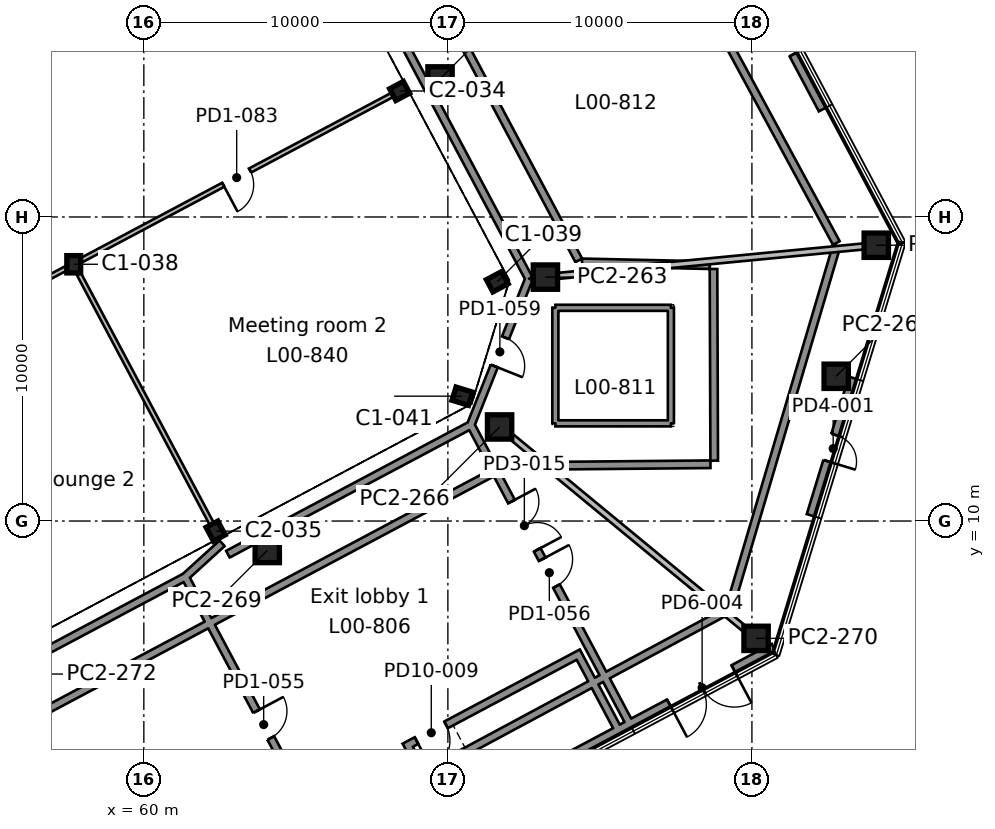
"""IFC4 building model, lengths in metres.
Left out: names, types, materials, properties, quantities, classifications, styles, units other than length and angle.
Written with IfcOpenShell. Run it as: python <this file> out.ifc"""

import sys

from ifc_helpers import new_model, si_unit, direction, frame, frame_2d, origin, origin_2d, place, context, subcontext, project, spatial, rectangle, i_section, extrude, element, fill, save


model = new_model("IFC4")
c1 = context("Model", 3, precision=1e-05, world=origin(), true_north=direction((0.0, 1.0)))
c2 = subcontext(c1, "Body", "Model", "MODEL_VIEW")
j1 = project(units=[si_unit("LENGTHUNIT", "METRE"), si_unit("PLANEANGLEUNIT", "RADIAN")], contexts=[c1])
p1 = place(None, origin())
s1 = spatial("IfcSite", under=j1, at=p1, CompositionType="ELEMENT")
p2 = place(p1, origin())
s2 = spatial("IfcBuilding", under=s1, at=p2, CompositionType="ELEMENT")
p3 = place(p2, origin())
s3 = spatial("IfcBuildingStorey", under=s2, at=p3, CompositionType="ELEMENT", Elevation=0.0)
p4 = place(p3, frame((62.361, 9.668, 0.0), z_axis=(0.0, 0.0, 1.0), x_axis=(0.882947592859, 0.469471562786, 0.0)))
e1 = element("IfcColumn", 1, at=p4, inside=s3, PredefinedType="COLUMN", context=c2, shape_type="SweptSolid", body=[
    extrude(i_section(OverallWidth=0.437, OverallDepth=0.513, WebThickness=0.061, FlangeThickness=0.097, FilletRadius=0.015, at=origin_2d()), origin(), (0.0, 0.0, 1.0), 7.0),
])
for number, where, z_axis, x_axis in (
    (2, (70.474, 14.106, 0.0), (0.0, 0.0, 1.0), (0.292, 0.956, 0.0)),
    (3, (71.625, 17.871, 0.0), (0.0, 0.0, 1.0), (-0.469, 0.883, 0.0)),
    (4, (57.694, 18.445, 0.0), (0.0, 0.0, 1.0), (1.0, 0.0, 0.0)),
):
    element("IfcColumn", number, at=place(p3, frame(where, z_axis=z_axis, x_axis=x_axis)), inside=s3, PredefinedType="COLUMN", context=c2, shape_type="SweptSolid", body=[
        extrude(i_section(OverallWidth=0.455, OverallDepth=0.569, WebThickness=0.078, FlangeThickness=0.125, FilletRadius=0.015, at=origin_2d()), origin(), (0.0, 0.0, 1.0), 7.0),
    ])
p5 = place(p3, frame((68.413, 24.144, 0.0), z_axis=(0.0, 0.0, 1.0), x_axis=(-0.469471562786, 0.882947592859, 0.0)))
e5 = element("IfcColumn", 5, at=p5, inside=s3, PredefinedType="COLUMN", context=c2, shape_type="SweptSolid", body=[
    extrude(i_section(OverallWidth=0.437, OverallDepth=0.513, WebThickness=0.061, FlangeThickness=0.097, FilletRadius=0.015, at=origin_2d()), origin(), (0.0, 0.0, 1.0), 7.0),
])
for number, where, z_axis, x_axis in (
    (6, (80.137, 6.141, 0.0), (0.0, 0.0, 1.0), (1.0, 0.0, 0.0)),
    (7, (64.059, 9.031, 0.0), (0.0, 0.0, 1.0), (1.0, 0.0, 0.0)),
    (8, (71.701, 13.094, 0.0), (0.0, 0.0, 1.0), (1.0, 0.0, 0.0)),
    (9, (82.772, 14.761, 0.0), (0.0, 0.0, 1.0), (1.0, 0.0, 0.0)),
    (10, (73.208, 18.023, 0.0), (0.0, 0.0, 1.0), (1.0, 0.0, 0.0)),
    (11, (84.09, 19.071, 0.0), (0.0, 0.0, 1.0), (1.0, 0.0, 0.0)),
    (12, (69.742, 24.541, 0.0), (0.0, 0.0, 1.0), (1.0, 0.0, 0.0)),
):
    element("IfcColumn", number, at=place(p3, frame(where, z_axis=z_axis, x_axis=x_axis)), inside=s3, PredefinedType="COLUMN", context=c2, shape_type="SweptSolid", body=[
        extrude(rectangle(XDim=0.8, YDim=0.8, at=origin_2d()), origin(), (0.0, 0.0, 1.0), 6.37),
    ])
p6 = place(p3, frame((66.617, -1.727, 0.0), z_axis=(0.0, 0.0, 1.0), x_axis=(0.882952470549, 0.469462389071, 0.0)))
e13 = element("IfcWall", 13, at=p6, inside=s3, PredefinedType="SOLIDWALL", context=c2, shape_type="SweptSolid", body=[
    extrude(rectangle(XDim=15.999, YDim=0.4, at=frame_2d((8.0, 0.0))), origin(), (0.0, 0.0, 1.0), 6.37),
])
p7 = place(p6, frame((0.9, 0.0, 0.0)))
e14 = element("IfcOpeningElement", 14, at=p7, cuts=e13, PredefinedType="OPENING", context=c2, shape_type="SweptSolid", body=[
    extrude(rectangle(XDim=1.8, YDim=2.1, at=frame_2d((0.9, 1.05))), frame((0.0, 0.21, 0.0), z_axis=(0.0, -1.0, 0.0), x_axis=(1.0, 0.0, 0.0)), (0.0, 0.0, 1.0), 0.42),
])
p8 = place(p6, frame((12.101, 0.0, 0.0)))
e15 = element("IfcOpeningElement", 15, at=p8, cuts=e13, PredefinedType="OPENING", context=c2, shape_type="SweptSolid", body=[
    extrude(rectangle(XDim=2.4, YDim=2.4, at=frame_2d((1.2, 1.2))), frame((0.0, 0.21, 0.0), z_axis=(0.0, -1.0, 0.0), x_axis=(1.0, 0.0, 0.0)), (0.0, 0.0, 1.0), 0.42),
])
p9 = place(p3, frame((81.996, 10.17, 0.0), z_axis=(0.0, 0.0, 1.0), x_axis=(0.292379898693, 0.956302250777, 0.0)))
e16 = element("IfcWall", 16, at=p9, inside=s3, PredefinedType="SOLIDWALL", context=c2, shape_type="SweptSolid", body=[
    extrude(rectangle(XDim=4.728, YDim=0.4, at=frame_2d((2.364, 0.0))), origin(), (0.0, 0.0, 1.0), 6.37),
])
p10 = place(p9, frame((1.864, 0.0, 0.0)))
e17 = element("IfcOpeningElement", 17, at=p10, cuts=e16, PredefinedType="OPENING", context=c2, shape_type="SweptSolid", body=[
    extrude(rectangle(XDim=0.9, YDim=2.1, at=frame_2d((0.45, 1.05))), frame((0.0, 0.21, 0.0), z_axis=(0.0, -1.0, 0.0), x_axis=(1.0, 0.0, 0.0)), (0.0, 0.0, 1.0), 0.42),
])
p11 = place(p3, frame((82.379, 23.567, 0.0), z_axis=(0.0, 0.0, 1.0), x_axis=(-0.469469391506, 0.882948747345, 0.0)))
e18 = element("IfcWall", 18, at=p11, inside=s3, PredefinedType="SOLIDWALL", context=c2, shape_type="SweptSolid", body=[
    extrude(rectangle(XDim=5.189, YDim=0.4, at=frame_2d((2.594, 0.0))), origin(), (0.0, 0.0, 1.0), 6.37),
])
p12 = place(p11, frame((2.052, 0.0, 0.0)))
e19 = element("IfcOpeningElement", 19, at=p12, cuts=e18, PredefinedType="OPENING", context=c2, shape_type="SweptSolid", body=[
    extrude(rectangle(XDim=0.9, YDim=2.1, at=frame_2d((0.45, 1.05))), frame((0.0, 0.21, 0.0), z_axis=(0.0, -1.0, 0.0), x_axis=(1.0, 0.0, 0.0)), (0.0, 0.0, 1.0), 0.42),
])
p13 = place(p3, frame((71.913, 11.806, 7.0), z_axis=(0.0, 0.0, 1.0), x_axis=(0.999958126226, 0.0091512728, 0.0)))
e20 = element("IfcWall", 20, at=p13, inside=s3, PredefinedType="STANDARD", context=c2, shape_type="SweptSolid", body=[
    extrude(rectangle(XDim=6.723, YDim=0.25, at=frame_2d((3.361, 0.0))), origin(), (0.0, 0.0, 1.0), 0.65),
])
p14 = place(p3, frame((78.76, 11.985, 7.0), z_axis=(0.0, 0.0, 1.0), x_axis=(-0.003678581112, 0.999993233998, 0.0)))
e21 = element("IfcWall", 21, at=p14, inside=s3, PredefinedType="STANDARD", context=c2, shape_type="SweptSolid", body=[
    extrude(rectangle(XDim=6.305, YDim=0.25, at=frame_2d((3.152, 0.0))), origin(), (0.0, 0.0, 1.0), 0.65),
])
p15 = place(p3, frame((78.615, 18.415, 7.0), z_axis=(0.0, 0.0, 1.0), x_axis=(-0.999755151848, 0.022127728178, 0.0)))
e22 = element("IfcWall", 22, at=p15, inside=s3, PredefinedType="STANDARD", context=c2, shape_type="SweptSolid", body=[
    extrude(rectangle(XDim=4.204, YDim=0.25, at=frame_2d((2.102, 0.0))), origin(), (0.0, 0.0, 1.0), 0.65),
])
p16 = place(p3, frame((74.304, 18.574, 7.0), z_axis=(0.0, 0.0, 1.0), x_axis=(-0.469619931493, 0.882868687827, 0.0)))
e23 = element("IfcWall", 23, at=p16, inside=s3, PredefinedType="STANDARD", context=c2, shape_type="SweptSolid", body=[
    extrude(rectangle(XDim=11.637, YDim=0.25, at=frame_2d((5.819, 0.0))), origin(), (0.0, 0.0, 1.0), 0.65),
])
p17 = place(p3, frame((75.513, 32.559, 7.0), z_axis=(0.0, 0.0, 1.0), x_axis=(0.476092369677, -0.879395278322, 0.0)))
e24 = element("IfcWall", 24, at=p17, inside=s3, PredefinedType="STANDARD", context=c2, shape_type="SweptSolid", body=[
    extrude(rectangle(XDim=15.254, YDim=0.25, at=frame_2d((7.627, 0.0))), origin(), (0.0, 0.0, 1.0), 0.65),
])
p18 = place(p3, frame((82.785, 19.05, 7.0), z_axis=(0.0, 0.0, 1.0), x_axis=(-0.28349877708, -0.958972597833, 0.0)))
e25 = element("IfcWall", 25, at=p18, inside=s3, PredefinedType="STANDARD", context=c2, shape_type="SweptSolid", body=[
    extrude(rectangle(XDim=12.437, YDim=0.25, at=frame_2d((6.219, 0.0))), origin(), (0.0, 0.0, 1.0), 0.65),
])
p19 = place(p3, frame((79.199, 7.048, 7.0), z_axis=(0.0, 0.0, 1.0), x_axis=(-0.880943825578, -0.473220853488, 0.0)))
e26 = element("IfcWall", 26, at=p19, inside=s3, PredefinedType="STANDARD", context=c2, shape_type="SweptSolid", body=[
    extrude(rectangle(XDim=27.337, YDim=0.25, at=frame_2d((13.668, 0.0))), origin(), (0.0, 0.0, 1.0), 0.65),
])
p20 = place(p3, frame((51.478, 0.954, 7.0), z_axis=(0.0, 0.0, 1.0), x_axis=(0.88290924417, 0.469543679075, 0.0)))
e27 = element("IfcWall", 27, at=p20, inside=s3, PredefinedType="STANDARD", context=c2, shape_type="SweptSolid", body=[
    extrude(rectangle(XDim=23.081, YDim=0.25, at=frame_2d((11.541, 0.0))), origin(), (0.0, 0.0, 1.0), 0.65),
])
for number, where, z_axis, x_axis in (
    (28, (77.335, 13.213, 6.92), (0.0, 0.0, 1.0), (-1.0, 0.0, 0.0)),
    (29, (73.535, 13.213, 6.92), (0.0, 0.0, 1.0), (0.0, 1.0, 0.0)),
    (30, (73.535, 17.013, 6.92), (0.0, 0.0, 1.0), (1.0, 0.0, 0.0)),
    (31, (77.335, 17.013, 6.92), (0.0, 0.0, 1.0), (0.0, -1.0, 0.0)),
):
    element("IfcWall", number, at=place(p3, frame(where, z_axis=z_axis, x_axis=x_axis)), inside=s3, PredefinedType="SOLIDWALL", context=c2, shape_type="SweptSolid", body=[
        extrude(rectangle(XDim=3.8, YDim=0.2, at=frame_2d((1.9, 0.0))), origin(), (0.0, 0.0, 1.0), 0.18),
    ])
p21 = place(p3, frame((66.523, -1.551, 0.0), z_axis=(0.0, 0.0, 1.0), x_axis=(-0.469471626463, 0.882947559001, 0.0)))
e32 = element("IfcWall", 32, at=p21, inside=s3, PredefinedType="SOLIDWALL", context=c2, shape_type="SweptSolid", body=[
    extrude(rectangle(XDim=11.0, YDim=0.25, at=frame_2d((5.5, 0.0))), origin(), (0.0, 0.0, 1.0), 6.37),
])
p22 = place(p21, frame((5.0, 0.0, 0.0)))
e33 = element("IfcOpeningElement", 33, at=p22, cuts=e32, PredefinedType="OPENING", context=c2, shape_type="SweptSolid", body=[
    extrude(rectangle(XDim=1.0, YDim=2.1, at=frame_2d((0.5, 1.05))), frame((0.0, 0.135, 0.0), z_axis=(0.0, -1.0, 0.0), x_axis=(1.0, 0.0, 0.0)), (0.0, 0.0, 1.0), 0.27),
])
p23 = place(p3, frame((61.363, 8.164, 0.0), z_axis=(0.0, 0.0, 1.0), x_axis=(-0.882945796858, -0.469474940556, 0.0)))
e34 = element("IfcWall", 34, at=p23, inside=s3, PredefinedType="SOLIDWALL", context=c2, shape_type="SweptSolid", body=[
    extrude(rectangle(XDim=5.955, YDim=0.25, at=frame_2d((2.978, 0.0))), origin(), (0.0, 0.0, 1.0), 6.37),
])
p24 = place(p3, frame((75.919, 3.445, 0.0), z_axis=(0.0, 0.0, 1.0), x_axis=(-0.469463523634, 0.882951867305, 0.0)))
e35 = element("IfcWall", 35, at=p24, inside=s3, PredefinedType="SOLIDWALL", context=c2, shape_type="SweptSolid", body=[
    extrude(rectangle(XDim=11.0, YDim=0.25, at=frame_2d((5.5, 0.0))), origin(), (0.0, 0.0, 1.0), 6.37),
])
p25 = place(p24, frame((5.0, 0.0, 0.0)))
e36 = element("IfcOpeningElement", 36, at=p25, cuts=e35, PredefinedType="OPENING", context=c2, shape_type="SweptSolid", body=[
    extrude(rectangle(XDim=1.0, YDim=2.1, at=frame_2d((0.5, 1.05))), frame((0.0, 0.135, 0.0), z_axis=(0.0, -1.0, 0.0), x_axis=(1.0, 0.0, 0.0)), (0.0, 0.0, 1.0), 0.27),
])
p26 = place(p24, frame((6.35, 0.0, 0.0)))
e37 = element("IfcOpeningElement", 37, at=p26, cuts=e35, PredefinedType="OPENING", context=c2, shape_type="SweptSolid", body=[
    extrude(rectangle(XDim=1.8, YDim=2.1, at=frame_2d((0.9, 1.05))), frame((0.0, 0.135, 0.0), z_axis=(0.0, -1.0, 0.0), x_axis=(1.0, 0.0, 0.0)), (0.0, 0.0, 1.0), 0.27),
])
p27 = place(p3, frame((62.573, 9.268, 0.0), z_axis=(0.0, 0.0, 1.0), x_axis=(-0.739544046234, -0.673108166404, 0.0)))
e38 = element("IfcWall", 38, at=p27, inside=s3, PredefinedType="SOLIDWALL", context=c2, shape_type="SweptSolid", body=[
    extrude(rectangle(XDim=1.646, YDim=0.25, at=frame_2d((0.823, 0.0))), origin(), (0.0, 0.0, 1.0), 6.37),
])
p28 = place(p3, frame((70.758, 13.159, 0.0), z_axis=(0.0, 0.0, 1.0), x_axis=(-0.882950480299, -0.46946613226, 0.0)))
e39 = element("IfcWall", 39, at=p28, inside=s3, PredefinedType="SOLIDWALL", context=c2, shape_type="SweptSolid", body=[
    extrude(rectangle(XDim=7.941, YDim=0.25, at=frame_2d((3.971, 0.0))), origin(), (0.0, 0.0, 1.0), 6.37),
])
p29 = place(p3, frame((63.659, 9.385, 0.0), z_axis=(0.0, 0.0, 1.0), x_axis=(-0.882866012348, -0.469624961263, 0.0)))
e40 = element("IfcWall", 40, at=p29, inside=s3, PredefinedType="SOLIDWALL", context=c2, shape_type="SweptSolid", body=[
    extrude(rectangle(XDim=1.013, YDim=0.25, at=frame_2d((0.507, 0.0))), origin(), (0.0, 0.0, 1.0), 6.37),
])
p30 = place(p3, frame((79.737, 6.47, 0.0), z_axis=(0.0, 0.0, 1.0), x_axis=(-0.771621787966, 0.63608161138, 0.0)))
e41 = element("IfcWall", 41, at=p30, inside=s3, PredefinedType="PARTITIONING", context=c2, shape_type="SweptSolid", body=[
    extrude(rectangle(XDim=9.896, YDim=0.2, at=frame_2d((4.948, 0.0))), origin(), (0.0, 0.0, 1.0), 6.37),
])
p31 = place(p3, frame((83.69, 19.032, 0.0), z_axis=(0.0, 0.0, 1.0), x_axis=(-0.995397009029, -0.095837333105, 0.0)))
e42 = element("IfcWall", 42, at=p31, inside=s3, PredefinedType="PARTITIONING", context=c2, shape_type="SweptSolid", body=[
    extrude(rectangle(XDim=10.129, YDim=0.2, at=frame_2d((5.064, 0.0))), origin(), (0.0, 0.0, 1.0), 6.37),
])
p32 = place(p3, frame((72.669, 17.971, 0.0), z_axis=(0.0, 0.0, 1.0), x_axis=(-0.370009777786, -0.929027859831, 0.0)))
e43 = element("IfcWall", 43, at=p32, inside=s3, PredefinedType="SOLIDWALL", context=c2, shape_type="SweptSolid", body=[
    extrude(rectangle(XDim=5.184, YDim=0.25, at=frame_2d((2.592, 0.0))), origin(), (0.0, 0.0, 1.0), 6.37),
])
p33 = place(p32, frame((2.092, 0.0, 0.0)))
e44 = element("IfcOpeningElement", 44, at=p33, cuts=e43, PredefinedType="OPENING", context=c2, shape_type="SweptSolid", body=[
    extrude(rectangle(XDim=1.0, YDim=2.1, at=frame_2d((0.5, 1.05))), frame((0.0, 0.135, 0.0), z_axis=(0.0, -1.0, 0.0), x_axis=(1.0, 0.0, 0.0)), (0.0, 0.0, 1.0), 0.27),
])
p34 = place(p3, frame((65.923, 30.659, 0.0), z_axis=(0.0, 0.0, 1.0), x_axis=(0.469479540895, -0.882943350777, 0.0)))
e45 = element("IfcWall", 45, at=p34, inside=s3, PredefinedType="SOLIDWALL", context=c2, shape_type="SweptSolid", body=[
    extrude(rectangle(XDim=7.283, YDim=0.25, at=frame_2d((3.642, 0.0))), origin(), (0.0, 0.0, 1.0), 6.37),
])
p35 = place(p34, frame((3.141, 0.0, 0.0)))
e46 = element("IfcOpeningElement", 46, at=p35, cuts=e45, PredefinedType="OPENING", context=c2, shape_type="SweptSolid", body=[
    extrude(rectangle(XDim=1.0, YDim=2.1, at=frame_2d((0.5, 1.05))), frame((0.0, 0.135, 0.0), z_axis=(0.0, -1.0, 0.0), x_axis=(1.0, 0.0, 0.0)), (0.0, 0.0, 1.0), 0.27),
])
p36 = place(p3, frame((69.389, 24.141, 0.0), z_axis=(0.0, 0.0, 1.0), x_axis=(0.469461736628, -0.882952817449, 0.0)))
e47 = element("IfcWall", 47, at=p36, inside=s3, PredefinedType="SOLIDWALL", context=c2, shape_type="SweptSolid", body=[
    extrude(rectangle(XDim=6.988, YDim=0.25, at=frame_2d((3.494, 0.0))), origin(), (0.0, 0.0, 1.0), 6.37),
])
p37 = place(p3, frame((48.421, 13.514, 0.0), z_axis=(0.0, 0.0, 1.0), x_axis=(0.882940965658, 0.469484026526, 0.0)))
e48 = element("IfcWall", 48, at=p37, inside=s3, PredefinedType="PARTITIONING", context=c2, shape_type="SweptSolid", body=[
    extrude(rectangle(XDim=10.205, YDim=0.15, at=frame_2d((5.103, 0.0))), origin(), (0.0, 0.0, 1.0), 6.55),
])
p38 = place(p37, frame((4.603, 0.0, 0.0)))
e49 = element("IfcOpeningElement", 49, at=p38, cuts=e48, PredefinedType="OPENING", context=c2, shape_type="SweptSolid", body=[
    extrude(rectangle(XDim=1.0, YDim=2.1, at=frame_2d((0.5, 1.05))), frame((0.0, 0.085, 0.0), z_axis=(0.0, -1.0, 0.0), x_axis=(1.0, 0.0, 0.0)), (0.0, 0.0, 1.0), 0.17),
])
p39 = place(p3, frame((57.957, 18.584, 0.0), z_axis=(0.0, 0.0, 1.0), x_axis=(0.882944872937, 0.469476678179, 0.0)))
e50 = element("IfcWall", 50, at=p39, inside=s3, PredefinedType="PARTITIONING", context=c2, shape_type="SweptSolid", body=[
    extrude(rectangle(XDim=11.586, YDim=0.15, at=frame_2d((5.793, 0.0))), origin(), (0.0, 0.0, 1.0), 6.55),
])
p40 = place(p39, frame((5.273, 0.0, 0.0)))
e51 = element("IfcOpeningElement", 51, at=p40, cuts=e50, PredefinedType="OPENING", context=c2, shape_type="SweptSolid", body=[
    extrude(rectangle(XDim=1.0, YDim=2.1, at=frame_2d((0.5, 1.05))), frame((0.0, 0.085, 0.0), z_axis=(0.0, -1.0, 0.0), x_axis=(1.0, 0.0, 0.0)), (0.0, 0.0, 1.0), 0.17),
])
p41 = place(p3, frame((62.24, 9.894, 0.0), z_axis=(0.0, 0.0, 1.0), x_axis=(-0.469471003187, 0.882947890403, 0.0)))
e52 = element("IfcWall", 52, at=p41, inside=s3, PredefinedType="PARTITIONING", context=c2, shape_type="SweptSolid", body=[
    extrude(rectangle(XDim=9.326, YDim=0.15, at=frame_2d((4.663, 0.0))), origin(), (0.0, 0.0, 1.0), 6.55),
])
p42 = place(p3, frame((69.937, 0.264, 0.0), z_axis=(0.0, 0.0, 1.0), x_axis=(-0.469533439143, 0.882914689835, 0.0)))
e53 = element("IfcWall", 53, at=p42, inside=s3, PredefinedType="SOLIDWALL", context=c2, shape_type="SweptSolid", body=[
    extrude(rectangle(XDim=2.8, YDim=0.25, at=frame_2d((1.4, 0.0))), origin(), (0.0, 0.0, 1.0), 6.37),
])
p43 = place(p3, frame((75.544, 3.245, 0.0), z_axis=(0.0, 0.0, 1.0), x_axis=(-0.469497295046, 0.882933910293, 0.0)))
e54 = element("IfcWall", 54, at=p43, inside=s3, PredefinedType="SOLIDWALL", context=c2, shape_type="SweptSolid", body=[
    extrude(rectangle(XDim=2.8, YDim=0.25, at=frame_2d((1.4, 0.0))), origin(), (0.0, 0.0, 1.0), 6.37),
])
p44 = place(p3, frame((68.571, 2.567, 0.0), z_axis=(0.0, 0.0, 1.0), x_axis=(0.882937969766, 0.469489660743, 0.0)))
e55 = element("IfcWall", 55, at=p44, inside=s3, PredefinedType="SOLIDWALL", context=c2, shape_type="SweptSolid", body=[
    extrude(rectangle(XDim=6.6, YDim=0.25, at=frame_2d((3.3, 0.0))), origin(), (0.0, 0.0, 1.0), 6.37),
])
p45 = place(p44, frame((0.45, 0.0, 0.0)))
e56 = element("IfcOpeningElement", 56, at=p45, cuts=e55, PredefinedType="OPENING", context=c2, shape_type="SweptSolid", body=[
    extrude(rectangle(XDim=1.1, YDim=2.1, at=frame_2d((0.55, 1.05))), frame((0.0, 0.135, 0.0), z_axis=(0.0, -1.0, 0.0), x_axis=(1.0, 0.0, 0.0)), (0.0, 0.0, 1.0), 0.27),
])
p46 = place(p8, frame((2.4, 0.0, 0.0), z_axis=(0.0, 0.0, 1.0), x_axis=(-1.0, 0.0, 0.0)))
e57 = element("IfcDoor", 57, at=p46, inside=s3, OperationType="DOUBLE_DOOR_SINGLE_SWING", PredefinedType="DOOR", context=c2, shape_type="SweptSolid", body=[
    extrude(rectangle(XDim=2.4, YDim=2.4, at=frame_2d((1.2, 1.2))), frame((0.0, 0.025, 0.0), z_axis=(0.0, -1.0, 0.0), x_axis=(1.0, 0.0, 0.0)), (0.0, 0.0, 1.0), 0.05),
])
fill(e15, e57)
p47 = place(p10, frame((0.9, 0.0, 0.0), z_axis=(0.0, 0.0, 1.0), x_axis=(-1.0, 0.0, 0.0)))
e58 = element("IfcDoor", 58, at=p47, inside=s3, OperationType="SINGLE_SWING_RIGHT", PredefinedType="DOOR", context=c2, shape_type="SweptSolid", body=[
    extrude(rectangle(XDim=0.9, YDim=2.1, at=frame_2d((0.45, 1.05))), frame((0.0, 0.025, 0.0), z_axis=(0.0, -1.0, 0.0), x_axis=(1.0, 0.0, 0.0)), (0.0, 0.0, 1.0), 0.05),
])
fill(e17, e58)
p48 = place(p12, frame((0.9, 0.0, 0.0), z_axis=(0.0, 0.0, 1.0), x_axis=(-1.0, 0.0, 0.0)))
e59 = element("IfcDoor", 59, at=p48, inside=s3, OperationType="SINGLE_SWING_LEFT", PredefinedType="DOOR", context=c2, shape_type="SweptSolid", body=[
    extrude(rectangle(XDim=0.9, YDim=2.1, at=frame_2d((0.45, 1.05))), frame((0.0, 0.025, 0.0), z_axis=(0.0, -1.0, 0.0), x_axis=(1.0, 0.0, 0.0)), (0.0, 0.0, 1.0), 0.05),
])
fill(e19, e59)
p49 = place(p3, frame((0.0, 0.0, 6.37)))
p50 = place(p49, frame((75.435, 15.113, 0.0)))
p51 = place(p50, frame((0.0, 0.0, 0.5)))
e60 = element("IfcWindow", 60, at=p51, inside=s3, PartitioningType="SINGLE_PANEL", PredefinedType="SKYLIGHT", context=c2, shape_type="SweptSolid", body=[
    extrude(rectangle(XDim=3.6, YDim=3.6, at=origin_2d()), origin(), (0.0, 0.0, 1.0), 0.05),
])
p52 = place(p45, frame((1.1, 0.0, 0.0), z_axis=(0.0, 0.0, 1.0), x_axis=(-1.0, 0.0, 0.0)))
e61 = element("IfcDoor", 61, at=p52, inside=s3, OperationType="SINGLE_SWING_RIGHT", PredefinedType="DOOR", context=c2, shape_type="SweptSolid", body=[
    extrude(rectangle(XDim=1.1, YDim=2.1, at=frame_2d((0.55, 1.05))), frame((0.0, 0.025, 0.0), z_axis=(0.0, -1.0, 0.0), x_axis=(1.0, 0.0, 0.0)), (0.0, 0.0, 1.0), 0.05),
])
fill(e56, e61)
p53 = place(p40, frame((1.0, 0.0, 0.0), z_axis=(0.0, 0.0, 1.0), x_axis=(-1.0, 0.0, 0.0)))
e62 = element("IfcDoor", 62, at=p53, inside=s3, OperationType="SINGLE_SWING_RIGHT", PredefinedType="DOOR", context=c2, shape_type="SweptSolid", body=[
    extrude(rectangle(XDim=1.0, YDim=2.1, at=frame_2d((0.5, 1.05))), frame((0.0, 0.025, 0.0), z_axis=(0.0, -1.0, 0.0), x_axis=(1.0, 0.0, 0.0)), (0.0, 0.0, 1.0), 0.05),
])
fill(e51, e62)
p54 = place(p25, frame((1.0, 0.0, 0.0), z_axis=(0.0, 0.0, 1.0), x_axis=(-1.0, 0.0, 0.0)))
e63 = element("IfcDoor", 63, at=p54, inside=s3, OperationType="SINGLE_SWING_LEFT", PredefinedType="DOOR", context=c2, shape_type="SweptSolid", body=[
    extrude(rectangle(XDim=1.0, YDim=2.1, at=frame_2d((0.5, 1.05))), frame((0.0, 0.025, 0.0), z_axis=(0.0, -1.0, 0.0), x_axis=(1.0, 0.0, 0.0)), (0.0, 0.0, 1.0), 0.05),
])
fill(e36, e63)
p55 = place(p22, frame((1.0, 0.0, 0.0), z_axis=(0.0, 0.0, 1.0), x_axis=(-1.0, 0.0, 0.0)))
e64 = element("IfcDoor", 64, at=p55, inside=s3, OperationType="SINGLE_SWING_LEFT", PredefinedType="DOOR", context=c2, shape_type="SweptSolid", body=[
    extrude(rectangle(XDim=1.0, YDim=2.1, at=frame_2d((0.5, 1.05))), frame((0.0, 0.025, 0.0), z_axis=(0.0, -1.0, 0.0), x_axis=(1.0, 0.0, 0.0)), (0.0, 0.0, 1.0), 0.05),
])
fill(e33, e64)
p56 = place(p26, frame((1.8, 0.0, 0.0), z_axis=(0.0, 0.0, 1.0), x_axis=(-1.0, 0.0, 0.0)))
e65 = element("IfcDoor", 65, at=p56, inside=s3, OperationType="DOUBLE_DOOR_SINGLE_SWING", PredefinedType="DOOR", context=c2, shape_type="SweptSolid", body=[
    extrude(rectangle(XDim=1.8, YDim=2.1, at=frame_2d((0.9, 1.05))), frame((0.0, 0.025, 0.0), z_axis=(0.0, -1.0, 0.0), x_axis=(1.0, 0.0, 0.0)), (0.0, 0.0, 1.0), 0.05),
])
fill(e37, e65)
p57 = place(p33, origin())
e66 = element("IfcDoor", 66, at=p57, inside=s3, OperationType="SINGLE_SWING_RIGHT", PredefinedType="DOOR", context=c2, shape_type="SweptSolid", body=[
    extrude(rectangle(XDim=1.0, YDim=2.1, at=frame_2d((0.5, 1.05))), frame((0.0, 0.025, 0.0), z_axis=(0.0, -1.0, 0.0), x_axis=(1.0, 0.0, 0.0)), (0.0, 0.0, 1.0), 0.05),
])
fill(e44, e66)
save(model, sys.argv[1])
